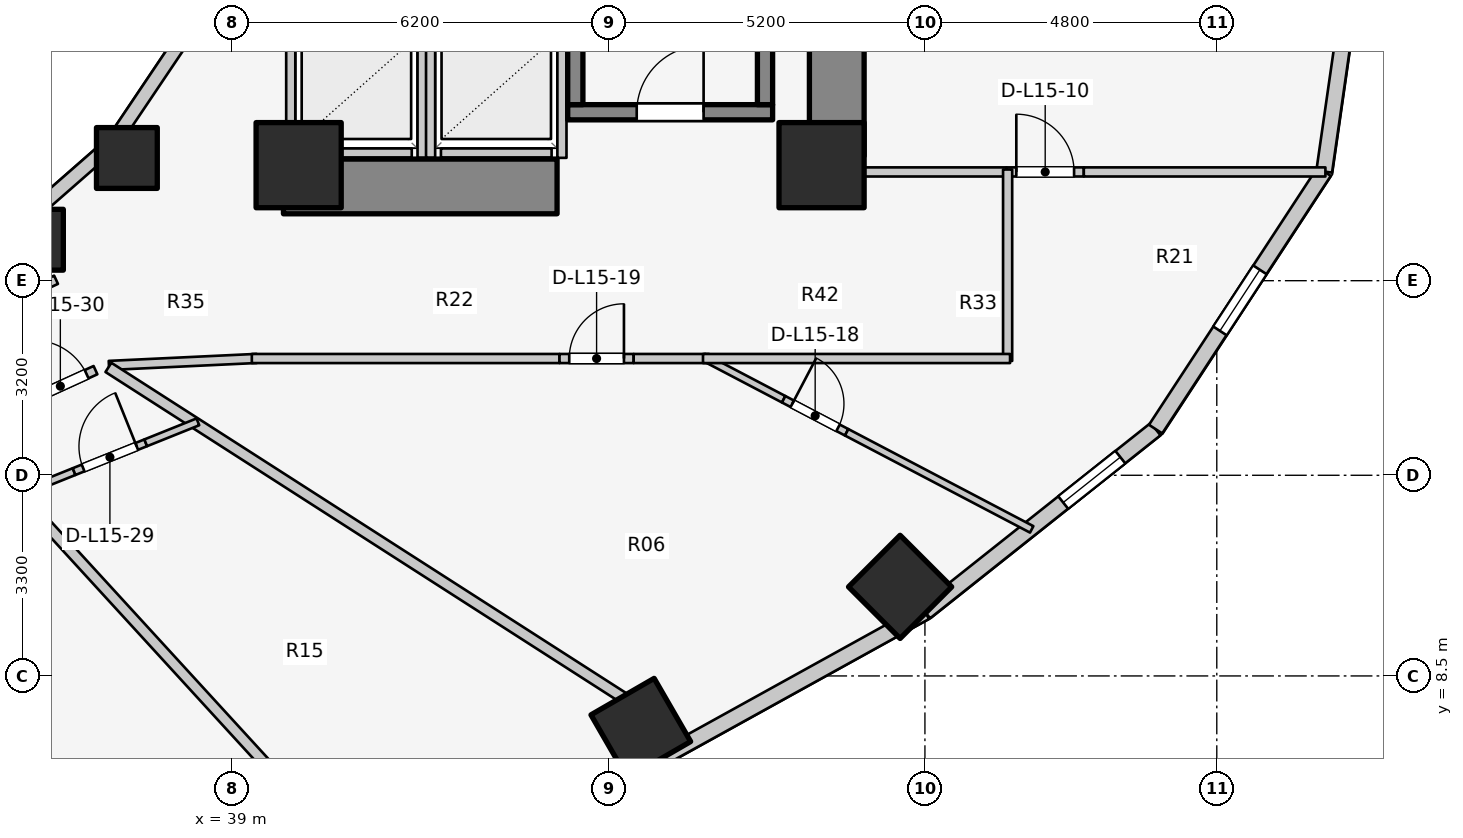
"""IFC4 building model, lengths in metres.
Left out: names, types, materials, properties, quantities, classifications, styles, units other than length and angle.
Written with IfcOpenShell. Run it as: python <this file> out.ifc"""

import sys

from ifc_helpers import new_model, si_unit, direction, frame, frame_2d, origin, origin_2d, place, context, subcontext, project, spatial, rectangle, extrude, element, fill, save


model = new_model("IFC4")
c1 = context("Model", 3, precision=1e-05, world=origin(), true_north=direction((0.0, 1.0)))
c2 = subcontext(c1, "Body", "Model", "MODEL_VIEW")
j1 = project(units=[si_unit("LENGTHUNIT", "METRE"), si_unit("PLANEANGLEUNIT", "RADIAN")], contexts=[c1])
p1 = place(None, origin())
s1 = spatial("IfcSite", under=j1, at=p1, CompositionType="ELEMENT")
p2 = place(p1, origin())
s2 = spatial("IfcBuilding", under=s1, at=p2, CompositionType="ELEMENT")
p3 = place(p2, frame((0.0, 0.0, 52.4)))
s3 = spatial("IfcBuildingStorey", under=s2, at=p3, CompositionType="ELEMENT", Elevation=52.4)
p4 = place(p3, frame((48.95, 17.05, 0.0), z_axis=(0.0, 0.0, 1.0), x_axis=(0.0, 1.0, 0.0)))
e1 = element("IfcWall", 1, at=p4, inside=s3, PredefinedType="SHEAR", context=c2, shape_type="SweptSolid", body=[
    extrude(rectangle(XDim=12.8, YDim=0.9, at=frame_2d((6.4, 0.0))), origin(), (0.0, 0.0, 1.0), 3.1),
])
p5 = place(p3, frame((39.85, 16.55, 0.0), z_axis=(0.0, 0.0, 1.0), x_axis=(1.0, 0.0, 0.0)))
e2 = element("IfcWall", 2, at=p5, inside=s3, PredefinedType="SHEAR", context=c2, shape_type="SweptSolid", body=[
    extrude(rectangle(XDim=4.5, YDim=0.9, at=frame_2d((2.25, 0.0))), origin(), (0.0, 0.0, 1.0), 3.1),
])
p6 = place(p3, frame((44.525, 17.77, 0.0), z_axis=(0.0, 0.0, 1.0), x_axis=(1.0, 0.0, 0.0)))
e3 = element("IfcWall", 3, at=p6, inside=s3, PredefinedType="SOLIDWALL", context=c2, shape_type="SweptSolid", body=[
    extrude(rectangle(XDim=3.37, YDim=0.25, at=frame_2d((1.685, 0.0))), origin(), (0.0, 0.0, 1.0), 3.1),
])
p7 = place(p6, frame((1.135, 0.0, 0.0)))
e4 = element("IfcOpeningElement", 4, at=p7, cuts=e3, PredefinedType="OPENING", context=c2, shape_type="SweptSolid", body=[
    extrude(rectangle(XDim=1.1, YDim=2.1, at=frame_2d((0.55, 1.05))), frame((0.0, 0.135, 0.0), z_axis=(0.0, -1.0, 0.0), x_axis=(1.0, 0.0, 0.0)), (0.0, 0.0, 1.0), 0.27),
])
for number, where, z_axis, x_axis in (
    (5, (44.65, 17.895, 0.0), (0.0, 0.0, 1.0), (0.0, 1.0, 0.0)),
    (6, (47.77, 17.895, 0.0), (0.0, 0.0, 1.0), (0.0, 1.0, 0.0)),
):
    element("IfcWall", number, at=place(p3, frame(where, z_axis=z_axis, x_axis=x_axis)), inside=s3, PredefinedType="SOLIDWALL", context=c2, shape_type="SweptSolid", body=[
        extrude(rectangle(XDim=7.81, YDim=0.25, at=frame_2d((3.905, 0.0))), origin(), (0.0, 0.0, 1.0), 3.1),
    ])
for number, where, z_axis, x_axis in (
    (7, (40.1, 16.9, 0.0), (0.0, 0.0, 1.0), (1.0, 0.0, 0.0)),
    (8, (48.7, 16.9, 0.0), (0.0, 0.0, 1.0), (1.0, 0.0, 0.0)),
):
    element("IfcColumn", number, at=place(p3, frame(where, z_axis=z_axis, x_axis=x_axis)), inside=s3, PredefinedType="COLUMN", context=c2, shape_type="SweptSolid", body=[
        extrude(rectangle(XDim=1.4, YDim=1.4, at=origin_2d()), origin(), (0.0, 0.0, 1.0), 3.1),
    ])
p8 = place(p3, frame((35.73, 15.673, 0.0), z_axis=(0.0, 0.0, 1.0), x_axis=(1.0, 0.0, 0.0)))
e9 = element("IfcColumn", 9, at=p8, inside=s3, PredefinedType="COLUMN", context=c2, shape_type="SweptSolid", body=[
    extrude(rectangle(XDim=1.0, YDim=1.0, at=origin_2d()), origin(), (0.0, 0.0, 1.0), 3.1),
])
p9 = place(p3, frame((45.727, 7.641, 0.0), z_axis=(0.0, 0.0, 1.0), x_axis=(0.5, -0.866025403784, 0.0)))
e10 = element("IfcColumn", 10, at=p9, inside=s3, PredefinedType="COLUMN", context=c2, shape_type="SweptSolid", body=[
    extrude(rectangle(XDim=1.2, YDim=1.2, at=origin_2d()), origin(), (0.0, 0.0, 1.0), 3.1),
])
p10 = place(p3, frame((37.275, 17.018, 0.0), z_axis=(0.0, 0.0, 1.0), x_axis=(1.0, 0.0, 0.0)))
e11 = element("IfcColumn", 11, at=p10, inside=s3, PredefinedType="COLUMN", context=c2, shape_type="SweptSolid", body=[
    extrude(rectangle(XDim=1.0, YDim=1.0, at=origin_2d()), origin(), (0.0, 0.0, 1.0), 3.1),
])
p11 = place(p3, frame((49.992, 9.965, 0.0), z_axis=(0.0, 0.0, 1.0), x_axis=(0.707106781187, -0.707106781187, 0.0)))
e12 = element("IfcColumn", 12, at=p11, inside=s3, PredefinedType="COLUMN", context=c2, shape_type="SweptSolid", body=[
    extrude(rectangle(XDim=1.2, YDim=1.2, at=origin_2d()), origin(), (0.0, 0.0, 1.0), 3.1),
])
p12 = place(p3, frame((35.56, 15.968, 0.0), z_axis=(0.0, 0.0, 1.0), x_axis=(0.752576694707, 0.658504607869, 0.0)))
e13 = element("IfcWall", 13, at=p12, inside=s3, PredefinedType="STANDARD", context=c2, shape_type="SweptSolid", body=[
    extrude(rectangle(XDim=1.959, YDim=0.23, at=frame_2d((0.98, 0.0))), origin(), (0.0, 0.0, 1.0), 1.22),
])
p13 = place(p3, frame((37.035, 17.258, 0.0), z_axis=(0.0, 0.0, 1.0), x_axis=(0.558197800898, 0.829707909492, 0.0)))
e14 = element("IfcWall", 14, at=p13, inside=s3, PredefinedType="STANDARD", context=c2, shape_type="SweptSolid", body=[
    extrude(rectangle(XDim=2.027, YDim=0.23, at=frame_2d((1.013, 0.0))), origin(), (0.0, 0.0, 1.0), 1.22),
])
p14 = place(p3, frame((46.042, 7.138, 0.0), z_axis=(0.0, 0.0, 1.0), x_axis=(0.875137303239, 0.483874674352, 0.0)))
e15 = element("IfcWall", 15, at=p14, inside=s3, PredefinedType="STANDARD", context=c2, shape_type="SweptSolid", body=[
    extrude(rectangle(XDim=4.985, YDim=0.26, at=frame_2d((2.493, 0.0))), origin(), (0.0, 0.0, 1.0), 1.22),
])
p15 = place(p3, frame((50.405, 9.55, 0.0), z_axis=(0.0, 0.0, 1.0), x_axis=(0.783123133379, 0.621866672179, 0.0)))
e16 = element("IfcWall", 16, at=p15, inside=s3, PredefinedType="STANDARD", context=c2, shape_type="SweptSolid", body=[
    extrude(rectangle(XDim=4.839, YDim=0.26, at=frame_2d((2.419, 0.0))), origin(), (0.0, 0.0, 1.0), 1.22),
])
p16 = place(p15, frame((2.898, 0.0, 0.15)))
e17 = element("IfcOpeningElement", 17, at=p16, cuts=e16, PredefinedType="OPENING", context=c2, shape_type="SweptSolid", body=[
    extrude(rectangle(XDim=1.2, YDim=0.9, at=frame_2d((0.6, 0.45))), frame((0.0, 0.14, 0.0), z_axis=(0.0, -1.0, 0.0), x_axis=(1.0, 0.0, 0.0)), (0.0, 0.0, 1.0), 0.28),
])
p17 = place(p3, frame((54.194, 12.559, 0.0), z_axis=(0.0, 0.0, 1.0), x_axis=(0.547702757047, 0.836672988642, 0.0)))
e18 = element("IfcWall", 18, at=p17, inside=s3, PredefinedType="STANDARD", context=c2, shape_type="SweptSolid", body=[
    extrude(rectangle(XDim=5.062, YDim=0.26, at=frame_2d((2.531, 0.0))), origin(), (0.0, 0.0, 1.0), 1.22),
])
p18 = place(p17, frame((1.931, 0.0, 0.15)))
e19 = element("IfcOpeningElement", 19, at=p18, cuts=e18, PredefinedType="OPENING", context=c2, shape_type="SweptSolid", body=[
    extrude(rectangle(XDim=1.2, YDim=0.9, at=frame_2d((0.6, 0.45))), frame((0.0, 0.14, 0.0), z_axis=(0.0, -1.0, 0.0), x_axis=(1.0, 0.0, 0.0)), (0.0, 0.0, 1.0), 0.28),
])
p19 = place(p3, frame((56.967, 16.795, 0.0), z_axis=(0.0, 0.0, 1.0), x_axis=(0.142528001686, 0.989790770181, 0.0)))
e20 = element("IfcWall", 20, at=p19, inside=s3, PredefinedType="STANDARD", context=c2, shape_type="SweptSolid", body=[
    extrude(rectangle(XDim=6.269, YDim=0.26, at=frame_2d((3.135, 0.0))), origin(), (0.0, 0.0, 1.0), 2.57),
])
p20 = place(p19, frame((2.385, 0.0, 0.75)))
e21 = element("IfcOpeningElement", 21, at=p20, cuts=e20, PredefinedType="OPENING", context=c2, shape_type="SweptSolid", body=[
    extrude(rectangle(XDim=1.5, YDim=1.6, at=frame_2d((0.75, 0.8))), frame((0.0, 0.14, 0.0), z_axis=(0.0, -1.0, 0.0), x_axis=(1.0, 0.0, 0.0)), (0.0, 0.0, 1.0), 0.28),
])
p21 = place(p3, frame((40.14, 17.1, 0.0), z_axis=(0.0, 0.0, 1.0), x_axis=(1.0, 0.0, 0.0)))
e22 = element("IfcWall", 22, at=p21, inside=s3, PredefinedType="SOLIDWALL", context=c2, shape_type="SweptSolid", body=[
    extrude(rectangle(XDim=1.82, YDim=0.15, at=frame_2d((0.91, 0.0))), origin(), (0.0, 0.0, 1.0), 2.12),
])
p22 = place(p3, frame((39.97, 17.02, 0.0), z_axis=(0.0, 0.0, 1.0), x_axis=(0.0, 1.0, 0.0)))
e23 = element("IfcWall", 23, at=p22, inside=s3, PredefinedType="SOLIDWALL", context=c2, shape_type="SweptSolid", body=[
    extrude(rectangle(XDim=2.22, YDim=0.15, at=frame_2d((1.11, 0.0))), origin(), (0.0, 0.0, 1.0), 1.873),
])
p23 = place(p3, frame((42.13, 17.02, 0.0), z_axis=(0.0, 0.0, 1.0), x_axis=(0.0, 1.0, 0.0)))
e24 = element("IfcWall", 24, at=p23, inside=s3, PredefinedType="SOLIDWALL", context=c2, shape_type="SweptSolid", body=[
    extrude(rectangle(XDim=2.22, YDim=0.15, at=frame_2d((1.11, 0.0))), origin(), (0.0, 0.0, 1.0), 2.575),
])
p24 = place(p3, frame((42.44, 17.1, 0.0), z_axis=(0.0, 0.0, 1.0), x_axis=(1.0, 0.0, 0.0)))
e25 = element("IfcWall", 25, at=p24, inside=s3, PredefinedType="SOLIDWALL", context=c2, shape_type="SweptSolid", body=[
    extrude(rectangle(XDim=1.82, YDim=0.15, at=frame_2d((0.91, 0.0))), origin(), (0.0, 0.0, 1.0), 2.575),
])
p25 = place(p3, frame((42.27, 17.02, 0.0), z_axis=(0.0, 0.0, 1.0), x_axis=(0.0, 1.0, 0.0)))
e26 = element("IfcWall", 26, at=p25, inside=s3, PredefinedType="SOLIDWALL", context=c2, shape_type="SweptSolid", body=[
    extrude(rectangle(XDim=2.22, YDim=0.15, at=frame_2d((1.11, 0.0))), origin(), (0.0, 0.0, 1.0), 2.575),
])
p26 = place(p3, frame((44.43, 17.02, 0.0), z_axis=(0.0, 0.0, 1.0), x_axis=(0.0, 1.0, 0.0)))
e27 = element("IfcWall", 27, at=p26, inside=s3, PredefinedType="SOLIDWALL", context=c2, shape_type="SweptSolid", body=[
    extrude(rectangle(XDim=2.22, YDim=0.15, at=frame_2d((1.11, 0.0))), origin(), (0.0, 0.0, 1.0), 2.12),
])
p27 = place(p3, frame((34.127, 14.094, 0.0), z_axis=(0.0, 0.0, 1.0), x_axis=(0.906943449489, 0.421252393975, 0.0)))
e28 = element("IfcWall", 28, at=p27, inside=s3, PredefinedType="PARTITIONING", context=c2, shape_type="SweptSolid", body=[
    extrude(rectangle(XDim=2.186, YDim=0.15, at=frame_2d((1.093, 0.0))), origin(), (0.0, 0.0, 1.0), 1.22),
])
p28 = place(p3, frame((48.95, 16.788, 0.0), z_axis=(0.0, 0.0, 1.0), x_axis=(1.0, 0.0, 0.0)))
e29 = element("IfcWall", 29, at=p28, inside=s3, PredefinedType="PARTITIONING", context=c2, shape_type="SweptSolid", body=[
    extrude(rectangle(XDim=2.793, YDim=0.15, at=frame_2d((1.396, 0.0))), origin(), (0.0, 0.0, 1.0), 1.22),
])
p29 = place(p3, frame((51.743, 16.788, 0.0), z_axis=(0.0, 0.0, 1.0), x_axis=(1.0, 0.0, 0.0)))
e30 = element("IfcWall", 30, at=p29, inside=s3, PredefinedType="PARTITIONING", context=c2, shape_type="SweptSolid", body=[
    extrude(rectangle(XDim=1.27, YDim=0.15, at=frame_2d((0.635, 0.0))), origin(), (0.0, 0.0, 1.0), 2.575),
])
p30 = place(p29, frame((0.16, 0.0, 0.0)))
e31 = element("IfcOpeningElement", 31, at=p30, cuts=e30, PredefinedType="OPENING", context=c2, shape_type="SweptSolid", body=[
    extrude(rectangle(XDim=0.95, YDim=2.1, at=frame_2d((0.475, 1.05))), frame((0.0, 0.085, 0.0), z_axis=(0.0, -1.0, 0.0), x_axis=(1.0, 0.0, 0.0)), (0.0, 0.0, 1.0), 0.17),
])
p31 = place(p3, frame((53.013, 16.788, 0.0), z_axis=(0.0, 0.0, 1.0), x_axis=(1.0, 0.0, 0.0)))
e32 = element("IfcWall", 32, at=p31, inside=s3, PredefinedType="PARTITIONING", context=c2, shape_type="SweptSolid", body=[
    extrude(rectangle(XDim=3.973, YDim=0.15, at=frame_2d((1.987, 0.0))), origin(), (0.0, 0.0, 1.0), 2.575),
])
p32 = place(p3, frame((51.76, 13.68, 0.0), z_axis=(0.0, 0.0, 1.0), x_axis=(0.0, 1.0, 0.0)))
e33 = element("IfcWall", 33, at=p32, inside=s3, PredefinedType="PARTITIONING", context=c2, shape_type="SweptSolid", body=[
    extrude(rectangle(XDim=3.148, YDim=0.15, at=frame_2d((1.574, 0.0))), origin(), (0.0, 0.0, 1.0), 2.575),
])
p33 = place(p3, frame((46.756, 13.743, 0.0), z_axis=(0.0, 0.0, 1.0), x_axis=(0.885552742751, -0.464538846391, 0.0)))
e34 = element("IfcWall", 34, at=p33, inside=s3, PredefinedType="MOVABLE", context=c2, shape_type="SweptSolid", body=[
    extrude(rectangle(XDim=1.492, YDim=0.12, at=frame_2d((0.746, 0.0))), origin(), (0.0, 0.0, 1.0), 2.575),
])
p34 = place(p3, frame((48.077, 13.05, 0.0), z_axis=(0.0, 0.0, 1.0), x_axis=(0.885533150024, -0.464576194191, 0.0)))
e35 = element("IfcWall", 35, at=p34, inside=s3, PredefinedType="MOVABLE", context=c2, shape_type="SweptSolid", body=[
    extrude(rectangle(XDim=1.17, YDim=0.12, at=frame_2d((0.585, 0.0))), origin(), (0.0, 0.0, 1.0), 2.11),
])
p35 = place(p34, frame((0.16, 0.0, 0.0)))
e36 = element("IfcOpeningElement", 36, at=p35, cuts=e35, PredefinedType="OPENING", context=c2, shape_type="SweptSolid", body=[
    extrude(rectangle(XDim=0.85, YDim=2.05, at=frame_2d((0.425, 1.025))), frame((0.0, 0.07, 0.0), z_axis=(0.0, -1.0, 0.0), x_axis=(1.0, 0.0, 0.0)), (0.0, 0.0, 1.0), 0.14),
])
p36 = place(p3, frame((49.113, 12.507, 0.0), z_axis=(0.0, 0.0, 1.0), x_axis=(0.885561599533, -0.464521962271, 0.0)))
e37 = element("IfcWall", 37, at=p36, inside=s3, PredefinedType="MOVABLE", context=c2, shape_type="SweptSolid", body=[
    extrude(rectangle(XDim=3.436, YDim=0.12, at=frame_2d((1.718, 0.0))), origin(), (0.0, 0.0, 1.0), 1.22),
])
p37 = place(p3, frame((36.98, 13.606, 0.0), z_axis=(0.0, 0.0, 1.0), x_axis=(0.998877427952, 0.047369651964, 0.0)))
e38 = element("IfcWall", 38, at=p37, inside=s3, PredefinedType="PARTITIONING", context=c2, shape_type="SweptSolid", body=[
    extrude(rectangle(XDim=2.433, YDim=0.15, at=frame_2d((1.216, 0.0))), origin(), (0.0, 0.0, 1.0), 1.22),
])
p38 = place(p3, frame((39.33, 13.72, 0.0), z_axis=(0.0, 0.0, 1.0), x_axis=(1.0, 0.0, 0.0)))
e39 = element("IfcWall", 39, at=p38, inside=s3, PredefinedType="PARTITIONING", context=c2, shape_type="SweptSolid", body=[
    extrude(rectangle(XDim=5.06, YDim=0.15, at=frame_2d((2.53, 0.0))), origin(), (0.0, 0.0, 1.0), 1.22),
])
p39 = place(p3, frame((44.39, 13.72, 0.0), z_axis=(0.0, 0.0, 1.0), x_axis=(1.0, 0.0, 0.0)))
e40 = element("IfcWall", 40, at=p39, inside=s3, PredefinedType="PARTITIONING", context=c2, shape_type="SweptSolid", body=[
    extrude(rectangle(XDim=1.22, YDim=0.15, at=frame_2d((0.61, 0.0))), origin(), (0.0, 0.0, 1.0), 2.575),
])
p40 = place(p39, frame((0.16, 0.0, 0.0)))
e41 = element("IfcOpeningElement", 41, at=p40, cuts=e40, PredefinedType="OPENING", context=c2, shape_type="SweptSolid", body=[
    extrude(rectangle(XDim=0.9, YDim=2.1, at=frame_2d((0.45, 1.05))), frame((0.0, 0.085, 0.0), z_axis=(0.0, -1.0, 0.0), x_axis=(1.0, 0.0, 0.0)), (0.0, 0.0, 1.0), 0.17),
])
p41 = place(p3, frame((45.61, 13.72, 0.0), z_axis=(0.0, 0.0, 1.0), x_axis=(1.0, 0.0, 0.0)))
e42 = element("IfcWall", 42, at=p41, inside=s3, PredefinedType="PARTITIONING", context=c2, shape_type="SweptSolid", body=[
    extrude(rectangle(XDim=1.24, YDim=0.15, at=frame_2d((0.62, 0.0))), origin(), (0.0, 0.0, 1.0), 2.575),
])
p42 = place(p3, frame((46.75, 13.72, 0.0), z_axis=(0.0, 0.0, 1.0), x_axis=(1.0, 0.0, 0.0)))
e43 = element("IfcWall", 43, at=p42, inside=s3, PredefinedType="PARTITIONING", context=c2, shape_type="SweptSolid", body=[
    extrude(rectangle(XDim=5.05, YDim=0.15, at=frame_2d((2.525, 0.0))), origin(), (0.0, 0.0, 1.0), 1.22),
])
p43 = place(p3, frame((34.586, 12.479, 0.0), z_axis=(0.0, 0.0, 1.0), x_axis=(0.675465011224, -0.737392038615, 0.0)))
e44 = element("IfcWall", 44, at=p43, inside=s3, PredefinedType="PARTITIONING", context=c2, shape_type="SweptSolid", body=[
    extrude(rectangle(XDim=8.007, YDim=0.18, at=frame_2d((4.003, 0.0))), origin(), (0.0, 0.0, 1.0), 1.22),
])
p44 = place(p3, frame((36.971, 13.574, 0.0), z_axis=(0.0, 0.0, 1.0), x_axis=(0.841689919529, -0.5399611832, 0.0)))
e45 = element("IfcWall", 45, at=p44, inside=s3, PredefinedType="PARTITIONING", context=c2, shape_type="SweptSolid", body=[
    extrude(rectangle(XDim=10.058, YDim=0.18, at=frame_2d((5.029, 0.0))), origin(), (0.0, 0.0, 1.0), 1.22),
])
p45 = place(p3, frame((35.444, 11.474, 0.0), z_axis=(0.0, 0.0, 1.0), x_axis=(0.927842429586, 0.372972419704, 0.0)))
e46 = element("IfcWall", 46, at=p45, inside=s3, PredefinedType="MOVABLE", context=c2, shape_type="SweptSolid", body=[
    extrude(rectangle(XDim=1.038, YDim=0.12, at=frame_2d((0.519, 0.0))), origin(), (0.0, 0.0, 1.0), 1.22),
])
p46 = place(p3, frame((36.407, 11.861, 0.0), z_axis=(0.0, 0.0, 1.0), x_axis=(0.927932127314, 0.372749201339, 0.0)))
e47 = element("IfcWall", 47, at=p46, inside=s3, PredefinedType="MOVABLE", context=c2, shape_type="SweptSolid", body=[
    extrude(rectangle(XDim=1.27, YDim=0.12, at=frame_2d((0.635, 0.0))), origin(), (0.0, 0.0, 1.0), 2.16),
])
p47 = place(p46, frame((0.16, 0.0, 0.0)))
e48 = element("IfcOpeningElement", 48, at=p47, cuts=e47, PredefinedType="OPENING", context=c2, shape_type="SweptSolid", body=[
    extrude(rectangle(XDim=0.95, YDim=2.1, at=frame_2d((0.475, 1.05))), frame((0.0, 0.07, 0.0), z_axis=(0.0, -1.0, 0.0), x_axis=(1.0, 0.0, 0.0)), (0.0, 0.0, 1.0), 0.14),
])
p48 = place(p3, frame((37.585, 12.334, 0.0), z_axis=(0.0, 0.0, 1.0), x_axis=(0.927874016973, 0.372893830233, 0.0)))
e49 = element("IfcWall", 49, at=p48, inside=s3, PredefinedType="MOVABLE", context=c2, shape_type="SweptSolid", body=[
    extrude(rectangle(XDim=0.924, YDim=0.12, at=frame_2d((0.462, 0.0))), origin(), (0.0, 0.0, 1.0), 2.575),
])
p49 = place(p3, frame((35.603, 13.001, 0.0), z_axis=(0.0, 0.0, 1.0), x_axis=(0.909740090182, 0.415178236804, 0.0)))
e50 = element("IfcWall", 50, at=p49, inside=s3, PredefinedType="PARTITIONING", context=c2, shape_type="SweptSolid", body=[
    extrude(rectangle(XDim=1.27, YDim=0.15, at=frame_2d((0.635, 0.0))), origin(), (0.0, 0.0, 1.0), 2.16),
])
p50 = place(p49, frame((0.16, 0.0, 0.0)))
e51 = element("IfcOpeningElement", 51, at=p50, cuts=e50, PredefinedType="OPENING", context=c2, shape_type="SweptSolid", body=[
    extrude(rectangle(XDim=0.95, YDim=2.1, at=frame_2d((0.475, 1.05))), frame((0.0, 0.085, 0.0), z_axis=(0.0, -1.0, 0.0), x_axis=(1.0, 0.0, 0.0)), (0.0, 0.0, 1.0), 0.17),
])
p51 = place(p16, origin())
e52 = element("IfcWindow", 52, at=p51, inside=s3, PartitioningType="SINGLE_PANEL", PredefinedType="WINDOW", context=c2, shape_type="SweptSolid", body=[
    extrude(rectangle(XDim=1.2, YDim=0.9, at=frame_2d((0.6, 0.45))), frame((0.0, 0.03, 0.0), z_axis=(0.0, -1.0, 0.0), x_axis=(1.0, 0.0, 0.0)), (0.0, 0.0, 1.0), 0.06),
])
fill(e17, e52)
p52 = place(p18, origin())
e53 = element("IfcWindow", 53, at=p52, inside=s3, PartitioningType="SINGLE_PANEL", PredefinedType="WINDOW", context=c2, shape_type="SweptSolid", body=[
    extrude(rectangle(XDim=1.2, YDim=0.9, at=frame_2d((0.6, 0.45))), frame((0.0, 0.03, 0.0), z_axis=(0.0, -1.0, 0.0), x_axis=(1.0, 0.0, 0.0)), (0.0, 0.0, 1.0), 0.06),
])
fill(e19, e53)
p53 = place(p7, origin())
e54 = element("IfcDoor", 54, at=p53, inside=s3, OperationType="SINGLE_SWING_RIGHT", PredefinedType="DOOR", context=c2, shape_type="SweptSolid", body=[
    extrude(rectangle(XDim=1.1, YDim=2.1, at=frame_2d((0.55, 1.05))), frame((0.0, 0.025, 0.0), z_axis=(0.0, -1.0, 0.0), x_axis=(1.0, 0.0, 0.0)), (0.0, 0.0, 1.0), 0.05),
])
fill(e4, e54)
p54 = place(p30, origin())
e55 = element("IfcDoor", 55, at=p54, inside=s3, OperationType="SINGLE_SWING_LEFT", PredefinedType="DOOR", context=c2, shape_type="SweptSolid", body=[
    extrude(rectangle(XDim=0.95, YDim=2.1, at=frame_2d((0.475, 1.05))), frame((0.0, 0.025, 0.0), z_axis=(0.0, -1.0, 0.0), x_axis=(1.0, 0.0, 0.0)), (0.0, 0.0, 1.0), 0.05),
])
fill(e31, e55)
p55 = place(p35, origin())
e56 = element("IfcDoor", 56, at=p55, inside=s3, OperationType="SINGLE_SWING_LEFT", PredefinedType="DOOR", context=c2, shape_type="SweptSolid", body=[
    extrude(rectangle(XDim=0.85, YDim=2.05, at=frame_2d((0.425, 1.025))), frame((0.0, 0.025, 0.0), z_axis=(0.0, -1.0, 0.0), x_axis=(1.0, 0.0, 0.0)), (0.0, 0.0, 1.0), 0.05),
])
fill(e36, e56)
p56 = place(p40, origin())
e57 = element("IfcDoor", 57, at=p56, inside=s3, OperationType="SINGLE_SWING_RIGHT", PredefinedType="DOOR", context=c2, shape_type="SweptSolid", body=[
    extrude(rectangle(XDim=0.9, YDim=2.1, at=frame_2d((0.45, 1.05))), frame((0.0, 0.025, 0.0), z_axis=(0.0, -1.0, 0.0), x_axis=(1.0, 0.0, 0.0)), (0.0, 0.0, 1.0), 0.05),
])
fill(e41, e57)
p57 = place(p47, origin())
e58 = element("IfcDoor", 58, at=p57, inside=s3, OperationType="SINGLE_SWING_RIGHT", PredefinedType="DOOR", context=c2, shape_type="SweptSolid", body=[
    extrude(rectangle(XDim=0.95, YDim=2.1, at=frame_2d((0.475, 1.05))), frame((0.0, 0.025, 0.0), z_axis=(0.0, -1.0, 0.0), x_axis=(1.0, 0.0, 0.0)), (0.0, 0.0, 1.0), 0.05),
])
fill(e48, e58)
p58 = place(p50, origin())
e59 = element("IfcDoor", 59, at=p58, inside=s3, OperationType="SINGLE_SWING_LEFT", PredefinedType="DOOR", context=c2, shape_type="SweptSolid", body=[
    extrude(rectangle(XDim=0.95, YDim=2.1, at=frame_2d((0.475, 1.05))), frame((0.0, 0.025, 0.0), z_axis=(0.0, -1.0, 0.0), x_axis=(1.0, 0.0, 0.0)), (0.0, 0.0, 1.0), 0.05),
])
fill(e51, e59)
save(model, sys.argv[1])
